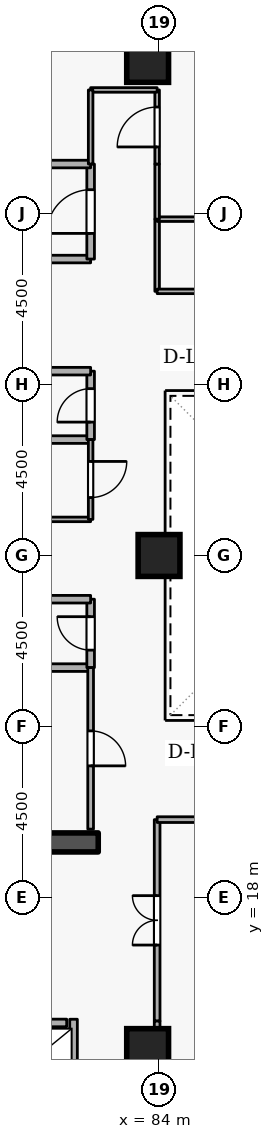
"""IFC4 building model, lengths in metres.
Left out: names, types, materials, properties, quantities, classifications, styles, units other than length and angle.
Written with IfcOpenShell. Run it as: python <this file> out.ifc"""

import sys

from ifc_helpers import new_model, si_unit, direction, frame, frame_2d, origin, origin_2d, place, context, subcontext, project, spatial, rectangle, extrude, element, fill, save


model = new_model("IFC4")
c1 = context("Model", 3, precision=1e-05, world=origin(), true_north=direction((0.0, 1.0)))
c2 = subcontext(c1, "Body", "Model", "MODEL_VIEW")
j1 = project(units=[si_unit("LENGTHUNIT", "METRE"), si_unit("PLANEANGLEUNIT", "RADIAN")], contexts=[c1])
p1 = place(None, origin())
s1 = spatial("IfcSite", under=j1, at=p1, CompositionType="ELEMENT")
p2 = place(p1, origin())
s2 = spatial("IfcBuilding", under=s1, at=p2, CompositionType="ELEMENT")
p3 = place(p2, frame((0.0, 0.0, 192.9)))
s3 = spatial("IfcBuildingStorey", under=s2, at=p3, CompositionType="ELEMENT", Elevation=192.9)
p4 = place(p3, frame((76.6, 19.45, 0.0), z_axis=(0.0, 0.0, 1.0), x_axis=(1.0, 0.0, 0.0)))
e1 = element("IfcWall", 1, at=p4, inside=s3, PredefinedType="SHEAR", context=c2, shape_type="SweptSolid", body=[
    extrude(rectangle(XDim=5.8, YDim=0.5, at=frame_2d((2.9, 0.0))), origin(), (0.0, 0.0, 1.0), 3.6),
])
for number, where, z_axis, x_axis in (
    (2, (83.7, 14.0, 0.0), (0.0, 0.0, 1.0), (1.0, 0.0, 0.0)),
    (3, (83.7, 40.0, 0.0), (0.0, 0.0, 1.0), (1.0, 0.0, 0.0)),
    (4, (84.0, 27.0, 0.0), (0.0, 0.0, 1.0), (1.0, 0.0, 0.0)),
):
    element("IfcColumn", number, at=place(p3, frame(where, z_axis=z_axis, x_axis=x_axis)), inside=s3, PredefinedType="COLUMN", context=c2, shape_type="SweptSolid", body=[
        extrude(rectangle(XDim=1.1, YDim=1.1, at=origin_2d()), origin(), (0.0, 0.0, 1.0), 3.6),
    ])
p5 = place(p3, frame((79.63, 14.7, 0.0), z_axis=(0.0, 0.0, 1.0), x_axis=(1.0, 0.0, 0.0)))
e5 = element("IfcWall", 5, at=p5, inside=s3, PredefinedType="STANDARD", context=c2, shape_type="SweptSolid", body=[
    extrude(rectangle(XDim=1.94, YDim=0.2, at=frame_2d((0.97, 0.0))), origin(), (0.0, 0.0, 1.0), 3.34),
])
p6 = place(p5, frame((0.46, 0.0, 0.0)))
e6 = element("IfcOpeningElement", 6, at=p6, cuts=e5, PredefinedType="OPENING", context=c2, shape_type="SweptSolid", body=[
    extrude(rectangle(XDim=1.02, YDim=2.06, at=frame_2d((0.51, 1.03))), frame((0.0, 0.11, 0.0), z_axis=(0.0, -1.0, 0.0), x_axis=(1.0, 0.0, 0.0)), (0.0, 0.0, 1.0), 0.22),
])
p7 = place(p3, frame((81.75, 12.612, 0.0), z_axis=(0.0, 0.0, 1.0), x_axis=(0.0, 1.0, 0.0)))
e7 = element("IfcWall", 7, at=p7, inside=s3, PredefinedType="STANDARD", context=c2, shape_type="SweptSolid", body=[
    extrude(rectangle(XDim=2.186, YDim=0.2, at=frame_2d((1.093, 0.0))), origin(), (0.0, 0.0, 1.0), 3.34),
])
p8 = place(p3, frame((79.9, 34.8, 0.0), z_axis=(0.0, 0.0, 1.0), x_axis=(1.0, 0.0, 0.0)))
e8 = element("IfcWall", 8, at=p8, inside=s3, PredefinedType="STANDARD", context=c2, shape_type="SweptSolid", body=[
    extrude(rectangle(XDim=2.3, YDim=0.2, at=frame_2d((1.15, 0.0))), origin(), (0.0, 0.0, 1.0), 2.545),
])
p9 = place(p3, frame((82.2, 34.8, 0.0), z_axis=(0.0, 0.0, 1.0), x_axis=(0.0, 1.0, 0.0)))
e9 = element("IfcWall", 9, at=p9, inside=s3, PredefinedType="STANDARD", context=c2, shape_type="SweptSolid", body=[
    extrude(rectangle(XDim=2.5, YDim=0.2, at=frame_2d((1.25, 0.0))), origin(), (0.0, 0.0, 1.0), 3.34),
])
p10 = place(p9, frame((0.675, 0.0, 0.0)))
e10 = element("IfcOpeningElement", 10, at=p10, cuts=e9, PredefinedType="OPENING", context=c2, shape_type="SweptSolid", body=[
    extrude(rectangle(XDim=1.15, YDim=2.1, at=frame_2d((0.575, 1.05))), frame((0.0, 0.11, 0.0), z_axis=(0.0, -1.0, 0.0), x_axis=(1.0, 0.0, 0.0)), (0.0, 0.0, 1.0), 0.22),
])
p11 = place(p3, frame((82.2, 37.3, 0.0), z_axis=(0.0, 0.0, 1.0), x_axis=(-1.0, 0.0, 0.0)))
e11 = element("IfcWall", 11, at=p11, inside=s3, PredefinedType="STANDARD", context=c2, shape_type="SweptSolid", body=[
    extrude(rectangle(XDim=5.7, YDim=0.2, at=frame_2d((2.85, 0.0))), origin(), (0.0, 0.0, 1.0), 3.34),
])
p12 = place(p3, frame((80.15, 24.05, 0.0), z_axis=(0.0, 0.0, 1.0), x_axis=(1.0, 0.0, 0.0)))
e12 = element("IfcWall", 12, at=p12, inside=s3, PredefinedType="STANDARD", context=c2, shape_type="SweptSolid", body=[
    extrude(rectangle(XDim=2.05, YDim=0.2, at=frame_2d((1.025, 0.0))), origin(), (0.0, 0.0, 1.0), 3.34),
])
p13 = place(p3, frame((82.2, 24.05, 0.0), z_axis=(0.0, 0.0, 1.0), x_axis=(0.0, 1.0, 0.0)))
e13 = element("IfcWall", 13, at=p13, inside=s3, PredefinedType="STANDARD", context=c2, shape_type="SweptSolid", body=[
    extrude(rectangle(XDim=1.8, YDim=0.2, at=frame_2d((0.9, 0.0))), origin(), (0.0, 0.0, 1.0), 3.34),
])
p14 = place(p13, frame((0.46, 0.0, 0.0)))
e14 = element("IfcOpeningElement", 14, at=p14, cuts=e13, PredefinedType="OPENING", context=c2, shape_type="SweptSolid", body=[
    extrude(rectangle(XDim=0.88, YDim=2.04, at=frame_2d((0.44, 1.02))), frame((0.0, 0.11, 0.0), z_axis=(0.0, -1.0, 0.0), x_axis=(1.0, 0.0, 0.0)), (0.0, 0.0, 1.0), 0.22),
])
for number, where, z_axis, x_axis in (
    (15, (82.2, 25.85, 0.0), (0.0, 0.0, 1.0), (-1.0, 0.0, 0.0)),
    (16, (80.15, 30.05, 0.0), (0.0, 0.0, 1.0), (1.0, 0.0, 0.0)),
):
    element("IfcWall", number, at=place(p3, frame(where, z_axis=z_axis, x_axis=x_axis)), inside=s3, PredefinedType="STANDARD", context=c2, shape_type="SweptSolid", body=[
        extrude(rectangle(XDim=2.05, YDim=0.2, at=frame_2d((1.025, 0.0))), origin(), (0.0, 0.0, 1.0), 3.34),
    ])
p15 = place(p3, frame((82.2, 30.05, 0.0), z_axis=(0.0, 0.0, 1.0), x_axis=(0.0, 1.0, 0.0)))
e17 = element("IfcWall", 17, at=p15, inside=s3, PredefinedType="STANDARD", context=c2, shape_type="SweptSolid", body=[
    extrude(rectangle(XDim=1.8, YDim=0.2, at=frame_2d((0.9, 0.0))), origin(), (0.0, 0.0, 1.0), 3.34),
])
p16 = place(p15, frame((0.46, 0.0, 0.0)))
e18 = element("IfcOpeningElement", 18, at=p16, cuts=e17, PredefinedType="OPENING", context=c2, shape_type="SweptSolid", body=[
    extrude(rectangle(XDim=0.88, YDim=2.04, at=frame_2d((0.44, 1.02))), frame((0.0, 0.11, 0.0), z_axis=(0.0, -1.0, 0.0), x_axis=(1.0, 0.0, 0.0)), (0.0, 0.0, 1.0), 0.22),
])
p17 = place(p3, frame((82.2, 31.85, 0.0), z_axis=(0.0, 0.0, 1.0), x_axis=(-1.0, 0.0, 0.0)))
e19 = element("IfcWall", 19, at=p17, inside=s3, PredefinedType="STANDARD", context=c2, shape_type="SweptSolid", body=[
    extrude(rectangle(XDim=2.05, YDim=0.2, at=frame_2d((1.025, 0.0))), origin(), (0.0, 0.0, 1.0), 3.34),
])
p18 = place(p3, frame((82.2, 24.05, 0.0), z_axis=(0.0, 0.0, 1.0), x_axis=(0.0, -1.0, 0.0)))
e20 = element("IfcWall", 20, at=p18, inside=s3, PredefinedType="PARTITIONING", context=c2, shape_type="SweptSolid", body=[
    extrude(rectangle(XDim=4.25, YDim=0.15, at=frame_2d((2.125, 0.0))), origin(), (0.0, 0.0, 1.0), 3.34),
])
p19 = place(p18, frame((1.665, 0.0, 0.0)))
e21 = element("IfcOpeningElement", 21, at=p19, cuts=e20, PredefinedType="OPENING", context=c2, shape_type="SweptSolid", body=[
    extrude(rectangle(XDim=0.92, YDim=2.08, at=frame_2d((0.46, 1.04))), frame((0.0, 0.085, 0.0), z_axis=(0.0, -1.0, 0.0), x_axis=(1.0, 0.0, 0.0)), (0.0, 0.0, 1.0), 0.17),
])
p20 = place(p3, frame((82.2, 27.95, 0.0), z_axis=(0.0, 0.0, 1.0), x_axis=(-1.0, 0.0, 0.0)))
e22 = element("IfcWall", 22, at=p20, inside=s3, PredefinedType="PARTITIONING", context=c2, shape_type="SweptSolid", body=[
    extrude(rectangle(XDim=2.05, YDim=0.12, at=frame_2d((1.025, 0.0))), origin(), (0.0, 0.0, 1.0), 3.34),
])
p21 = place(p3, frame((82.2, 30.05, 0.0), z_axis=(0.0, 0.0, 1.0), x_axis=(0.0, -1.0, 0.0)))
e23 = element("IfcWall", 23, at=p21, inside=s3, PredefinedType="PARTITIONING", context=c2, shape_type="SweptSolid", body=[
    extrude(rectangle(XDim=2.1, YDim=0.12, at=frame_2d((1.05, 0.0))), origin(), (0.0, 0.0, 1.0), 3.34),
])
p22 = place(p21, frame((0.575, 0.0, 0.0)))
e24 = element("IfcOpeningElement", 24, at=p22, cuts=e23, PredefinedType="OPENING", context=c2, shape_type="SweptSolid", body=[
    extrude(rectangle(XDim=0.95, YDim=2.1, at=frame_2d((0.475, 1.05))), frame((0.0, 0.07, 0.0), z_axis=(0.0, -1.0, 0.0), x_axis=(1.0, 0.0, 0.0)), (0.0, 0.0, 1.0), 0.14),
])
p23 = place(p3, frame((83.95, 14.75, 0.0), z_axis=(0.0, 0.0, 1.0), x_axis=(0.0, 1.0, 0.0)))
e25 = element("IfcWall", 25, at=p23, inside=s3, PredefinedType="PARTITIONING", context=c2, shape_type="SweptSolid", body=[
    extrude(rectangle(XDim=5.3, YDim=0.15, at=frame_2d((2.65, 0.0))), origin(), (0.0, 0.0, 1.0), 3.34),
])
p24 = place(p23, frame((2.0, 0.0, 0.0)))
e26 = element("IfcOpeningElement", 26, at=p24, cuts=e25, PredefinedType="OPENING", context=c2, shape_type="SweptSolid", body=[
    extrude(rectangle(XDim=1.3, YDim=2.12, at=frame_2d((0.65, 1.06))), frame((0.0, 0.085, 0.0), z_axis=(0.0, -1.0, 0.0), x_axis=(1.0, 0.0, 0.0)), (0.0, 0.0, 1.0), 0.17),
])
p25 = place(p3, frame((83.95, 20.05, 0.0), z_axis=(0.0, 0.0, 1.0), x_axis=(1.0, 0.0, 0.0)))
e27 = element("IfcWall", 27, at=p25, inside=s3, PredefinedType="PARTITIONING", context=c2, shape_type="SweptSolid", body=[
    extrude(rectangle(XDim=2.25, YDim=0.15, at=frame_2d((1.125, 0.0))), origin(), (0.0, 0.0, 1.0), 3.34),
])
p26 = place(p3, frame((83.95, 12.4, 0.0), z_axis=(0.0, 0.0, 1.0), x_axis=(0.0, 1.0, 0.0)))
e28 = element("IfcWall", 28, at=p26, inside=s3, PredefinedType="PARTITIONING", context=c2, shape_type="SweptSolid", body=[
    extrude(rectangle(XDim=2.35, YDim=0.15, at=frame_2d((1.175, 0.0))), origin(), (0.0, 0.0, 1.0), 3.34),
])
p27 = place(p3, frame((83.95, 33.95, 0.0), z_axis=(0.0, 0.0, 1.0), x_axis=(0.0, 1.0, 0.0)))
e29 = element("IfcWall", 29, at=p27, inside=s3, PredefinedType="PARTITIONING", context=c2, shape_type="SweptSolid", body=[
    extrude(rectangle(XDim=1.9, YDim=0.12, at=frame_2d((0.95, 0.0))), origin(), (0.0, 0.0, 1.0), 3.34),
])
p28 = place(p3, frame((83.95, 35.85, 0.0), z_axis=(0.0, 0.0, 1.0), x_axis=(1.0, 0.0, 0.0)))
e30 = element("IfcWall", 30, at=p28, inside=s3, PredefinedType="PARTITIONING", context=c2, shape_type="SweptSolid", body=[
    extrude(rectangle(XDim=4.55, YDim=0.12, at=frame_2d((2.275, 0.0))), origin(), (0.0, 0.0, 1.0), 3.34),
])
p29 = place(p3, frame((88.5, 33.95, 0.0), z_axis=(0.0, 0.0, 1.0), x_axis=(-1.0, 0.0, 0.0)))
e31 = element("IfcWall", 31, at=p29, inside=s3, PredefinedType="PARTITIONING", context=c2, shape_type="SweptSolid", body=[
    extrude(rectangle(XDim=4.55, YDim=0.12, at=frame_2d((2.275, 0.0))), origin(), (0.0, 0.0, 1.0), 3.34),
])
p30 = place(p29, frame((1.8, 0.0, 0.0)))
e32 = element("IfcOpeningElement", 32, at=p30, cuts=e31, PredefinedType="OPENING", context=c2, shape_type="SweptSolid", body=[
    extrude(rectangle(XDim=0.95, YDim=2.1, at=frame_2d((0.475, 1.05))), frame((0.0, 0.07, 0.0), z_axis=(0.0, -1.0, 0.0), x_axis=(1.0, 0.0, 0.0)), (0.0, 0.0, 1.0), 0.14),
])
p31 = place(p3, frame((83.95, 35.85, 0.0), z_axis=(0.0, 0.0, 1.0), x_axis=(0.0, 1.0, 0.0)))
e33 = element("IfcWall", 33, at=p31, inside=s3, PredefinedType="PARTITIONING", context=c2, shape_type="SweptSolid", body=[
    extrude(rectangle(XDim=1.45, YDim=0.12, at=frame_2d((0.725, 0.0))), origin(), (0.0, 0.0, 1.0), 3.34),
])
p32 = place(p3, frame((83.95, 37.3, 0.0), z_axis=(0.0, 0.0, 1.0), x_axis=(0.0, 1.0, 0.0)))
e34 = element("IfcWall", 34, at=p32, inside=s3, PredefinedType="PARTITIONING", context=c2, shape_type="SweptSolid", body=[
    extrude(rectangle(XDim=1.95, YDim=0.12, at=frame_2d((0.975, 0.0))), origin(), (0.0, 0.0, 1.0), 3.34),
])
p33 = place(p32, frame((0.45, 0.0, 0.0)))
e35 = element("IfcOpeningElement", 35, at=p33, cuts=e34, PredefinedType="OPENING", context=c2, shape_type="SweptSolid", body=[
    extrude(rectangle(XDim=1.05, YDim=2.1, at=frame_2d((0.525, 1.05))), frame((0.0, 0.07, 0.0), z_axis=(0.0, -1.0, 0.0), x_axis=(1.0, 0.0, 0.0)), (0.0, 0.0, 1.0), 0.14),
])
p34 = place(p3, frame((83.95, 39.25, 0.0), z_axis=(0.0, 0.0, 1.0), x_axis=(-1.0, 0.0, 0.0)))
e36 = element("IfcWall", 36, at=p34, inside=s3, PredefinedType="PARTITIONING", context=c2, shape_type="SweptSolid", body=[
    extrude(rectangle(XDim=1.75, YDim=0.12, at=frame_2d((0.875, 0.0))), origin(), (0.0, 0.0, 1.0), 3.34),
])
p35 = place(p3, frame((82.2, 39.25, 0.0), z_axis=(0.0, 0.0, 1.0), x_axis=(0.0, -1.0, 0.0)))
e37 = element("IfcWall", 37, at=p35, inside=s3, PredefinedType="PARTITIONING", context=c2, shape_type="SweptSolid", body=[
    extrude(rectangle(XDim=1.95, YDim=0.12, at=frame_2d((0.975, 0.0))), origin(), (0.0, 0.0, 1.0), 3.34),
])
p36 = place(p10, origin())
e38 = element("IfcDoor", 38, at=p36, inside=s3, OperationType="SINGLE_SWING_LEFT", PredefinedType="DOOR", context=c2, shape_type="SweptSolid", body=[
    extrude(rectangle(XDim=1.15, YDim=2.1, at=frame_2d((0.575, 1.05))), frame((0.0, 0.025, 0.0), z_axis=(0.0, -1.0, 0.0), x_axis=(1.0, 0.0, 0.0)), (0.0, 0.0, 1.0), 0.05),
])
fill(e10, e38)
p37 = place(p14, origin())
e39 = element("IfcDoor", 39, at=p37, inside=s3, OperationType="SINGLE_SWING_RIGHT", PredefinedType="DOOR", context=c2, shape_type="SweptSolid", body=[
    extrude(rectangle(XDim=0.88, YDim=2.04, at=frame_2d((0.44, 1.02))), frame((0.0, 0.025, 0.0), z_axis=(0.0, -1.0, 0.0), x_axis=(1.0, 0.0, 0.0)), (0.0, 0.0, 1.0), 0.05),
])
fill(e14, e39)
p38 = place(p16, origin())
e40 = element("IfcDoor", 40, at=p38, inside=s3, OperationType="SINGLE_SWING_LEFT", PredefinedType="DOOR", context=c2, shape_type="SweptSolid", body=[
    extrude(rectangle(XDim=0.88, YDim=2.04, at=frame_2d((0.44, 1.02))), frame((0.0, 0.025, 0.0), z_axis=(0.0, -1.0, 0.0), x_axis=(1.0, 0.0, 0.0)), (0.0, 0.0, 1.0), 0.05),
])
fill(e18, e40)
p39 = place(p19, origin())
e41 = element("IfcDoor", 41, at=p39, inside=s3, OperationType="SINGLE_SWING_RIGHT", PredefinedType="DOOR", context=c2, shape_type="SweptSolid", body=[
    extrude(rectangle(XDim=0.92, YDim=2.08, at=frame_2d((0.46, 1.04))), frame((0.0, 0.025, 0.0), z_axis=(0.0, -1.0, 0.0), x_axis=(1.0, 0.0, 0.0)), (0.0, 0.0, 1.0), 0.05),
])
fill(e21, e41)
p40 = place(p22, origin())
e42 = element("IfcDoor", 42, at=p40, inside=s3, OperationType="SINGLE_SWING_LEFT", PredefinedType="DOOR", context=c2, shape_type="SweptSolid", body=[
    extrude(rectangle(XDim=0.95, YDim=2.1, at=frame_2d((0.475, 1.05))), frame((0.0, 0.025, 0.0), z_axis=(0.0, -1.0, 0.0), x_axis=(1.0, 0.0, 0.0)), (0.0, 0.0, 1.0), 0.05),
])
fill(e24, e42)
p41 = place(p24, origin())
e43 = element("IfcDoor", 43, at=p41, inside=s3, OperationType="DOUBLE_DOOR_SINGLE_SWING", PredefinedType="DOOR", context=c2, shape_type="SweptSolid", body=[
    extrude(rectangle(XDim=1.3, YDim=2.12, at=frame_2d((0.65, 1.06))), frame((0.0, 0.025, 0.0), z_axis=(0.0, -1.0, 0.0), x_axis=(1.0, 0.0, 0.0)), (0.0, 0.0, 1.0), 0.05),
])
fill(e26, e43)
p42 = place(p33, origin())
e44 = element("IfcDoor", 44, at=p42, inside=s3, OperationType="SINGLE_SWING_LEFT", PredefinedType="DOOR", context=c2, shape_type="SweptSolid", body=[
    extrude(rectangle(XDim=1.05, YDim=2.1, at=frame_2d((0.525, 1.05))), frame((0.0, 0.025, 0.0), z_axis=(0.0, -1.0, 0.0), x_axis=(1.0, 0.0, 0.0)), (0.0, 0.0, 1.0), 0.05),
])
fill(e35, e44)
save(model, sys.argv[1])
